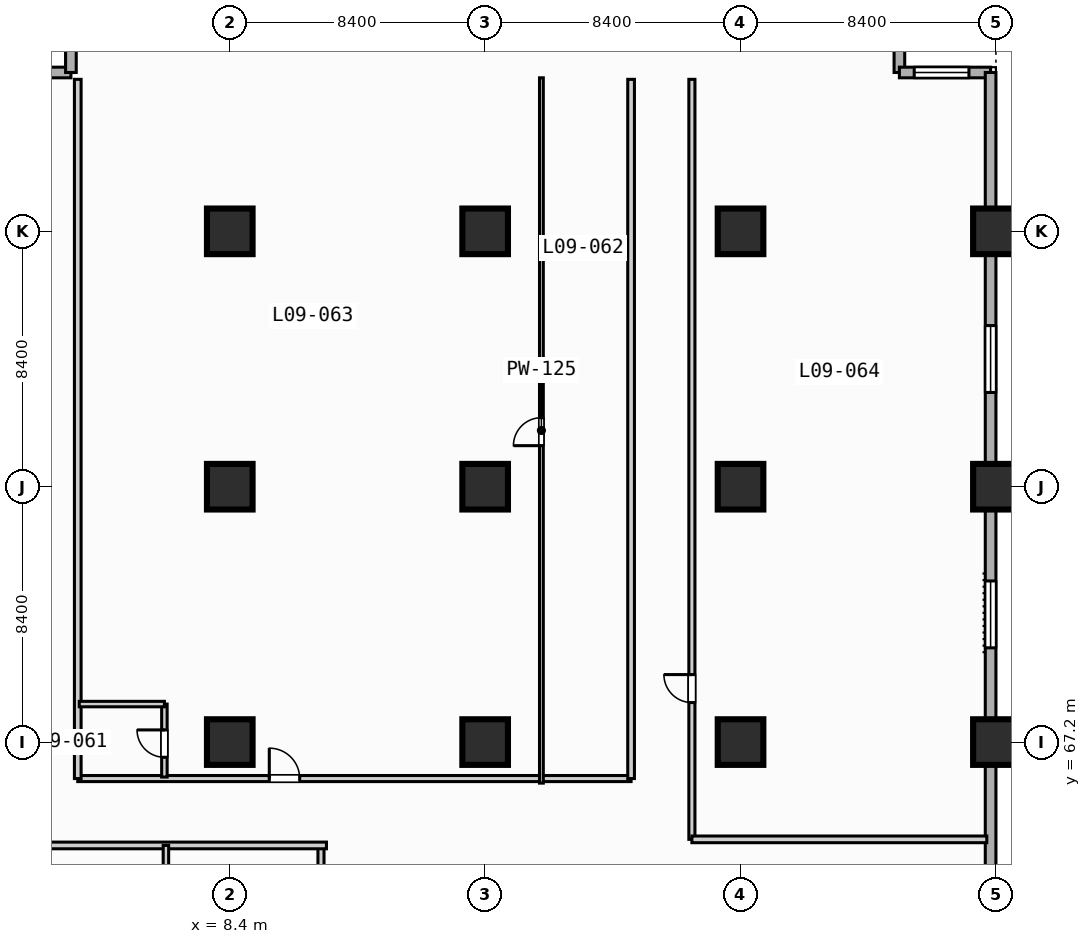
"""IFC4 building model, lengths in metres.
Left out: names, types, materials, properties, quantities, classifications, styles, units other than length and angle.
Written with IfcOpenShell. Run it as: python <this file> out.ifc"""

import sys

from ifc_helpers import new_model, si_unit, direction, frame, frame_2d, origin, origin_2d, place, context, subcontext, project, spatial, rectangle, extrude, element, fill, save


model = new_model("IFC4")
c1 = context("Model", 3, precision=1e-05, world=origin(), true_north=direction((0.0, 1.0)))
c2 = subcontext(c1, "Body", "Model", "MODEL_VIEW")
j1 = project(units=[si_unit("LENGTHUNIT", "METRE"), si_unit("PLANEANGLEUNIT", "RADIAN")], contexts=[c1])
p1 = place(None, origin())
s1 = spatial("IfcSite", under=j1, at=p1, CompositionType="ELEMENT")
p2 = place(p1, origin())
s2 = spatial("IfcBuilding", under=s1, at=p2, CompositionType="ELEMENT")
p3 = place(p2, frame((0.0, 0.0, 43.4)))
s3 = spatial("IfcBuildingStorey", under=s2, at=p3, CompositionType="ELEMENT", Elevation=43.4)
for number, where, z_axis, x_axis in (
    (1, (8.4, 67.2, 0.0), (0.0, 0.0, 1.0), (1.0, 0.0, 0.0)),
    (2, (8.4, 75.6, 0.0), (0.0, 0.0, 1.0), (1.0, 0.0, 0.0)),
    (3, (8.4, 84.0, 0.0), (0.0, 0.0, 1.0), (1.0, 0.0, 0.0)),
    (4, (16.8, 67.2, 0.0), (0.0, 0.0, 1.0), (1.0, 0.0, 0.0)),
    (5, (16.8, 75.6, 0.0), (0.0, 0.0, 1.0), (1.0, 0.0, 0.0)),
    (6, (16.8, 84.0, 0.0), (0.0, 0.0, 1.0), (1.0, 0.0, 0.0)),
    (7, (25.2, 67.2, 0.0), (0.0, 0.0, 1.0), (1.0, 0.0, 0.0)),
    (8, (25.2, 75.6, 0.0), (0.0, 0.0, 1.0), (1.0, 0.0, 0.0)),
    (9, (25.2, 84.0, 0.0), (0.0, 0.0, 1.0), (1.0, 0.0, 0.0)),
    (10, (33.6, 67.2, 0.0), (0.0, 0.0, 1.0), (1.0, 0.0, 0.0)),
    (11, (33.6, 75.6, 0.0), (0.0, 0.0, 1.0), (1.0, 0.0, 0.0)),
    (12, (33.6, 84.0, 0.0), (0.0, 0.0, 1.0), (1.0, 0.0, 0.0)),
):
    element("IfcColumn", number, at=place(p3, frame(where, z_axis=z_axis, x_axis=x_axis)), inside=s3, PredefinedType="COLUMN", context=c2, shape_type="SweptSolid", body=[
        extrude(rectangle(XDim=1.5, YDim=1.5, at=origin_2d()), origin(), (0.0, 0.0, 1.0), 3.8),
    ])
for number, where, z_axis, x_axis in (
    (13, (0.175, 89.225, 0.0), (0.0, 0.0, 1.0), (1.0, 0.0, 0.0)),
    (14, (3.175, 89.225, 0.0), (0.0, 0.0, 1.0), (0.0, 1.0, 0.0)),
    (15, (30.425, 92.225, 0.0), (0.0, 0.0, 1.0), (0.0, -1.0, 0.0)),
):
    element("IfcWall", number, at=place(p3, frame(where, z_axis=z_axis, x_axis=x_axis)), inside=s3, PredefinedType="STANDARD", context=c2, shape_type="SweptSolid", body=[
        extrude(rectangle(XDim=3.0, YDim=0.35, at=frame_2d((1.5, 0.0))), origin(), (0.0, 0.0, 1.0), 3.55),
    ])
p4 = place(p3, frame((30.425, 89.225, 0.0), z_axis=(0.0, 0.0, 1.0), x_axis=(1.0, 0.0, 0.0)))
e16 = element("IfcWall", 16, at=p4, inside=s3, PredefinedType="STANDARD", context=c2, shape_type="SweptSolid", body=[
    extrude(rectangle(XDim=3.0, YDim=0.35, at=frame_2d((1.5, 0.0))), origin(), (0.0, 0.0, 1.0), 3.55),
])
p5 = place(p4, frame((0.488, 0.0, 0.85)))
e17 = element("IfcOpeningElement", 17, at=p5, cuts=e16, PredefinedType="OPENING", context=c2, shape_type="SweptSolid", body=[
    extrude(rectangle(XDim=1.8, YDim=1.8, at=frame_2d((0.9, 0.9))), frame((0.0, 0.185, 0.0), z_axis=(0.0, -1.0, 0.0), x_axis=(1.0, 0.0, 0.0)), (0.0, 0.0, 1.0), 0.37),
])
p6 = place(p3, frame((33.425, 89.225, 0.0), z_axis=(0.0, 0.0, 1.0), x_axis=(0.0, -1.0, 0.0)))
e18 = element("IfcWall", 18, at=p6, inside=s3, PredefinedType="STANDARD", context=c2, shape_type="SweptSolid", body=[
    extrude(rectangle(XDim=55.8, YDim=0.35, at=frame_2d((27.9, 0.0))), origin(), (0.0, 0.0, 1.0), 3.55),
])
p7 = place(p6, frame((16.725, 0.0, 0.85)))
e19 = element("IfcOpeningElement", 19, at=p7, cuts=e18, PredefinedType="OPENING", context=c2, shape_type="SweptSolid", body=[
    extrude(rectangle(XDim=2.2, YDim=1.8, at=frame_2d((1.1, 0.9))), frame((0.0, 0.185, 0.0), z_axis=(0.0, -1.0, 0.0), x_axis=(1.0, 0.0, 0.0)), (0.0, 0.0, 1.0), 0.37),
])
p8 = place(p6, frame((8.325, 0.0, 0.85)))
e20 = element("IfcOpeningElement", 20, at=p8, cuts=e18, PredefinedType="OPENING", context=c2, shape_type="SweptSolid", body=[
    extrude(rectangle(XDim=2.2, YDim=1.8, at=frame_2d((1.1, 0.9))), frame((0.0, 0.185, 0.0), z_axis=(0.0, -1.0, 0.0), x_axis=(1.0, 0.0, 0.0)), (0.0, 0.0, 1.0), 0.37),
])
p9 = place(p3, frame((11.4, 3.4, 0.0), z_axis=(0.0, 0.0, 1.0), x_axis=(0.0, 1.0, 0.0)))
e21 = element("IfcWall", 21, at=p9, inside=s3, PredefinedType="PARTITIONING", context=c2, shape_type="SweptSolid", body=[
    extrude(rectangle(XDim=60.4, YDim=0.2, at=frame_2d((30.2, 0.0))), origin(), (0.0, 0.0, 1.0), 3.55),
])
p10 = place(p9, frame((6.065, 0.0, 0.0)))
e22 = element("IfcOpeningElement", 22, at=p10, cuts=e21, PredefinedType="OPENING", context=c2, shape_type="SweptSolid", body=[
    extrude(rectangle(XDim=1.0, YDim=2.15, at=frame_2d((0.5, 1.075))), frame((0.0, 0.11, 0.0), z_axis=(0.0, -1.0, 0.0), x_axis=(1.0, 0.0, 0.0)), (0.0, 0.0, 1.0), 0.22),
])
p11 = place(p9, frame((13.735, 0.0, 0.0)))
e23 = element("IfcOpeningElement", 23, at=p11, cuts=e21, PredefinedType="OPENING", context=c2, shape_type="SweptSolid", body=[
    extrude(rectangle(XDim=1.0, YDim=2.15, at=frame_2d((0.5, 1.075))), frame((0.0, 0.11, 0.0), z_axis=(0.0, -1.0, 0.0), x_axis=(1.0, 0.0, 0.0)), (0.0, 0.0, 1.0), 0.22),
])
p12 = place(p9, frame((22.96, 0.0, 0.0)))
e24 = element("IfcOpeningElement", 24, at=p12, cuts=e21, PredefinedType="OPENING", context=c2, shape_type="SweptSolid", body=[
    extrude(rectangle(XDim=1.0, YDim=2.15, at=frame_2d((0.5, 1.075))), frame((0.0, 0.11, 0.0), z_axis=(0.0, -1.0, 0.0), x_axis=(1.0, 0.0, 0.0)), (0.0, 0.0, 1.0), 0.22),
])
p13 = place(p9, frame((31.785, 0.0, 0.0)))
e25 = element("IfcOpeningElement", 25, at=p13, cuts=e21, PredefinedType="OPENING", context=c2, shape_type="SweptSolid", body=[
    extrude(rectangle(XDim=1.0, YDim=2.15, at=frame_2d((0.5, 1.075))), frame((0.0, 0.11, 0.0), z_axis=(0.0, -1.0, 0.0), x_axis=(1.0, 0.0, 0.0)), (0.0, 0.0, 1.0), 0.22),
])
p14 = place(p9, frame((42.56, 0.0, 0.0)))
e26 = element("IfcOpeningElement", 26, at=p14, cuts=e21, PredefinedType="OPENING", context=c2, shape_type="SweptSolid", body=[
    extrude(rectangle(XDim=1.0, YDim=2.15, at=frame_2d((0.5, 1.075))), frame((0.0, 0.11, 0.0), z_axis=(0.0, -1.0, 0.0), x_axis=(1.0, 0.0, 0.0)), (0.0, 0.0, 1.0), 0.22),
])
p15 = place(p9, frame((53.935, 0.0, 0.0)))
e27 = element("IfcOpeningElement", 27, at=p15, cuts=e21, PredefinedType="OPENING", context=c2, shape_type="SweptSolid", body=[
    extrude(rectangle(XDim=1.0, YDim=2.15, at=frame_2d((0.5, 1.075))), frame((0.0, 0.11, 0.0), z_axis=(0.0, -1.0, 0.0), x_axis=(1.0, 0.0, 0.0)), (0.0, 0.0, 1.0), 0.22),
])
p16 = place(p3, frame((0.2, 63.8, 0.0), z_axis=(0.0, 0.0, 1.0), x_axis=(1.0, 0.0, 0.0)))
e28 = element("IfcWall", 28, at=p16, inside=s3, PredefinedType="PARTITIONING", context=c2, shape_type="SweptSolid", body=[
    extrude(rectangle(XDim=11.38, YDim=0.22, at=frame_2d((5.69, 0.0))), origin(), (0.0, 0.0, 1.0), 3.55),
])
p17 = place(p3, frame((6.3, 61.55, 0.0), z_axis=(0.0, 0.0, 1.0), x_axis=(0.0, 1.0, 0.0)))
e29 = element("IfcWall", 29, at=p17, inside=s3, PredefinedType="PLUMBINGWALL", context=c2, shape_type="SweptSolid", body=[
    extrude(rectangle(XDim=2.25, YDim=0.18, at=frame_2d((1.125, 0.0))), origin(), (0.0, 0.0, 1.0), 3.55),
])
p18 = place(p17, frame((0.675, 0.0, 0.0)))
e30 = element("IfcOpeningElement", 30, at=p18, cuts=e29, PredefinedType="OPENING", context=c2, shape_type="SweptSolid", body=[
    extrude(rectangle(XDim=0.9, YDim=2.1, at=frame_2d((0.45, 1.05))), frame((0.0, 0.1, 0.0), z_axis=(0.0, -1.0, 0.0), x_axis=(1.0, 0.0, 0.0)), (0.0, 0.0, 1.0), 0.2),
])
p19 = place(p3, frame((3.4, 66.0, 0.0), z_axis=(0.0, 0.0, 1.0), x_axis=(1.0, 0.0, 0.0)))
e31 = element("IfcWall", 31, at=p19, inside=s3, PredefinedType="PARTITIONING", context=c2, shape_type="SweptSolid", body=[
    extrude(rectangle(XDim=18.2, YDim=0.2, at=frame_2d((9.1, 0.0))), origin(), (0.0, 0.0, 1.0), 3.55),
])
p20 = place(p19, frame((6.3, 0.0, 0.0)))
e32 = element("IfcOpeningElement", 32, at=p20, cuts=e31, PredefinedType="OPENING", context=c2, shape_type="SweptSolid", body=[
    extrude(rectangle(XDim=1.0, YDim=2.15, at=frame_2d((0.5, 1.075))), frame((0.0, 0.11, 0.0), z_axis=(0.0, -1.0, 0.0), x_axis=(1.0, 0.0, 0.0)), (0.0, 0.0, 1.0), 0.22),
])
for number, where, z_axis, x_axis in (
    (33, (21.6, 66.0, 0.0), (0.0, 0.0, 1.0), (0.0, 1.0, 0.0)),
    (34, (3.4, 66.0, 0.0), (0.0, 0.0, 1.0), (0.0, 1.0, 0.0)),
):
    element("IfcWall", number, at=place(p3, frame(where, z_axis=z_axis, x_axis=x_axis)), inside=s3, PredefinedType="PARTITIONING", context=c2, shape_type="SweptSolid", body=[
        extrude(rectangle(XDim=23.0, YDim=0.22, at=frame_2d((11.5, 0.0))), origin(), (0.0, 0.0, 1.0), 3.55),
    ])
p21 = place(p3, frame((6.25, 66.05, 0.0), z_axis=(0.0, 0.0, 1.0), x_axis=(0.0, 1.0, 0.0)))
e35 = element("IfcWall", 35, at=p21, inside=s3, PredefinedType="PLUMBINGWALL", context=c2, shape_type="SweptSolid", body=[
    extrude(rectangle(XDim=2.4, YDim=0.18, at=frame_2d((1.2, 0.0))), origin(), (0.0, 0.0, 1.0), 3.55),
])
p22 = place(p21, frame((0.65, 0.0, 0.0)))
e36 = element("IfcOpeningElement", 36, at=p22, cuts=e35, PredefinedType="OPENING", context=c2, shape_type="SweptSolid", body=[
    extrude(rectangle(XDim=0.9, YDim=2.1, at=frame_2d((0.45, 1.05))), frame((0.0, 0.1, 0.0), z_axis=(0.0, -1.0, 0.0), x_axis=(1.0, 0.0, 0.0)), (0.0, 0.0, 1.0), 0.2),
])
p23 = place(p3, frame((3.45, 68.45, 0.0), z_axis=(0.0, 0.0, 1.0), x_axis=(1.0, 0.0, 0.0)))
e37 = element("IfcWall", 37, at=p23, inside=s3, PredefinedType="PLUMBINGWALL", context=c2, shape_type="SweptSolid", body=[
    extrude(rectangle(XDim=2.8, YDim=0.18, at=frame_2d((1.4, 0.0))), origin(), (0.0, 0.0, 1.0), 3.55),
])
p24 = place(p3, frame((18.65, 65.85, 0.0), z_axis=(0.0, 0.0, 1.0), x_axis=(0.0, 1.0, 0.0)))
e38 = element("IfcWall", 38, at=p24, inside=s3, PredefinedType="PARTITIONING", context=c2, shape_type="SweptSolid", body=[
    extrude(rectangle(XDim=23.2, YDim=0.125, at=frame_2d((11.6, 0.0))), origin(), (0.0, 0.0, 1.0), 3.55),
])
p25 = place(p24, frame((11.1, 0.0, 0.0)))
e39 = element("IfcOpeningElement", 39, at=p25, cuts=e38, PredefinedType="OPENING", context=c2, shape_type="SweptSolid", body=[
    extrude(rectangle(XDim=0.92, YDim=2.1, at=frame_2d((0.46, 1.05))), frame((0.0, 0.073, 0.0), z_axis=(0.0, -1.0, 0.0), x_axis=(1.0, 0.0, 0.0)), (0.0, 0.0, 1.0), 0.145),
])
p26 = place(p3, frame((23.6, 64.0, 0.0), z_axis=(0.0, 0.0, 1.0), x_axis=(0.0, 1.0, 0.0)))
e40 = element("IfcWall", 40, at=p26, inside=s3, PredefinedType="PARTITIONING", context=c2, shape_type="SweptSolid", body=[
    extrude(rectangle(XDim=25.0, YDim=0.2, at=frame_2d((12.5, 0.0))), origin(), (0.0, 0.0, 1.0), 3.55),
])
p27 = place(p26, frame((4.5, 0.0, 0.0)))
e41 = element("IfcOpeningElement", 41, at=p27, cuts=e40, PredefinedType="OPENING", context=c2, shape_type="SweptSolid", body=[
    extrude(rectangle(XDim=0.92, YDim=2.1, at=frame_2d((0.46, 1.05))), frame((0.0, 0.11, 0.0), z_axis=(0.0, -1.0, 0.0), x_axis=(1.0, 0.0, 0.0)), (0.0, 0.0, 1.0), 0.22),
])
p28 = place(p3, frame((23.6, 64.0, 0.0), z_axis=(0.0, 0.0, 1.0), x_axis=(1.0, 0.0, 0.0)))
e42 = element("IfcWall", 42, at=p28, inside=s3, PredefinedType="PARTITIONING", context=c2, shape_type="SweptSolid", body=[
    extrude(rectangle(XDim=9.7, YDim=0.22, at=frame_2d((4.85, 0.0))), origin(), (0.0, 0.0, 1.0), 3.55),
])
p29 = place(p5, origin())
e43 = element("IfcWindow", 43, at=p29, inside=s3, PartitioningType="SINGLE_PANEL", PredefinedType="WINDOW", context=c2, shape_type="SweptSolid", body=[
    extrude(rectangle(XDim=1.8, YDim=1.8, at=frame_2d((0.9, 0.9))), frame((0.0, 0.03, 0.0), z_axis=(0.0, -1.0, 0.0), x_axis=(1.0, 0.0, 0.0)), (0.0, 0.0, 1.0), 0.06),
])
fill(e17, e43)
p30 = place(p7, origin())
e44 = element("IfcWindow", 44, at=p30, inside=s3, PartitioningType="SINGLE_PANEL", PredefinedType="WINDOW", context=c2, shape_type="SweptSolid", body=[
    extrude(rectangle(XDim=2.2, YDim=1.8, at=frame_2d((1.1, 0.9))), frame((0.0, 0.03, 0.0), z_axis=(0.0, -1.0, 0.0), x_axis=(1.0, 0.0, 0.0)), (0.0, 0.0, 1.0), 0.06),
])
fill(e19, e44)
p31 = place(p8, origin())
e45 = element("IfcWindow", 45, at=p31, inside=s3, PartitioningType="SINGLE_PANEL", PredefinedType="WINDOW", context=c2, shape_type="SweptSolid", body=[
    extrude(rectangle(XDim=2.2, YDim=1.8, at=frame_2d((1.1, 0.9))), frame((0.0, 0.03, 0.0), z_axis=(0.0, -1.0, 0.0), x_axis=(1.0, 0.0, 0.0)), (0.0, 0.0, 1.0), 0.06),
])
fill(e20, e45)
p32 = place(p20, origin())
e46 = element("IfcDoor", 46, at=p32, inside=s3, OperationType="SINGLE_SWING_LEFT", PredefinedType="DOOR", context=c2, shape_type="SweptSolid", body=[
    extrude(rectangle(XDim=1.0, YDim=2.15, at=frame_2d((0.5, 1.075))), frame((0.0, 0.025, 0.0), z_axis=(0.0, -1.0, 0.0), x_axis=(1.0, 0.0, 0.0)), (0.0, 0.0, 1.0), 0.05),
])
fill(e32, e46)
p33 = place(p22, origin())
e47 = element("IfcDoor", 47, at=p33, inside=s3, OperationType="SINGLE_SWING_RIGHT", PredefinedType="DOOR", context=c2, shape_type="SweptSolid", body=[
    extrude(rectangle(XDim=0.9, YDim=2.1, at=frame_2d((0.45, 1.05))), frame((0.0, 0.025, 0.0), z_axis=(0.0, -1.0, 0.0), x_axis=(1.0, 0.0, 0.0)), (0.0, 0.0, 1.0), 0.05),
])
fill(e36, e47)
p34 = place(p25, origin())
e48 = element("IfcDoor", 48, at=p34, inside=s3, OperationType="SINGLE_SWING_LEFT", PredefinedType="DOOR", context=c2, shape_type="SweptSolid", body=[
    extrude(rectangle(XDim=0.92, YDim=2.1, at=frame_2d((0.46, 1.05))), frame((0.0, 0.025, 0.0), z_axis=(0.0, -1.0, 0.0), x_axis=(1.0, 0.0, 0.0)), (0.0, 0.0, 1.0), 0.05),
])
fill(e39, e48)
p35 = place(p27, origin())
e49 = element("IfcDoor", 49, at=p35, inside=s3, OperationType="SINGLE_SWING_RIGHT", PredefinedType="DOOR", context=c2, shape_type="SweptSolid", body=[
    extrude(rectangle(XDim=0.92, YDim=2.1, at=frame_2d((0.46, 1.05))), frame((0.0, 0.025, 0.0), z_axis=(0.0, -1.0, 0.0), x_axis=(1.0, 0.0, 0.0)), (0.0, 0.0, 1.0), 0.05),
])
fill(e41, e49)
save(model, sys.argv[1])
